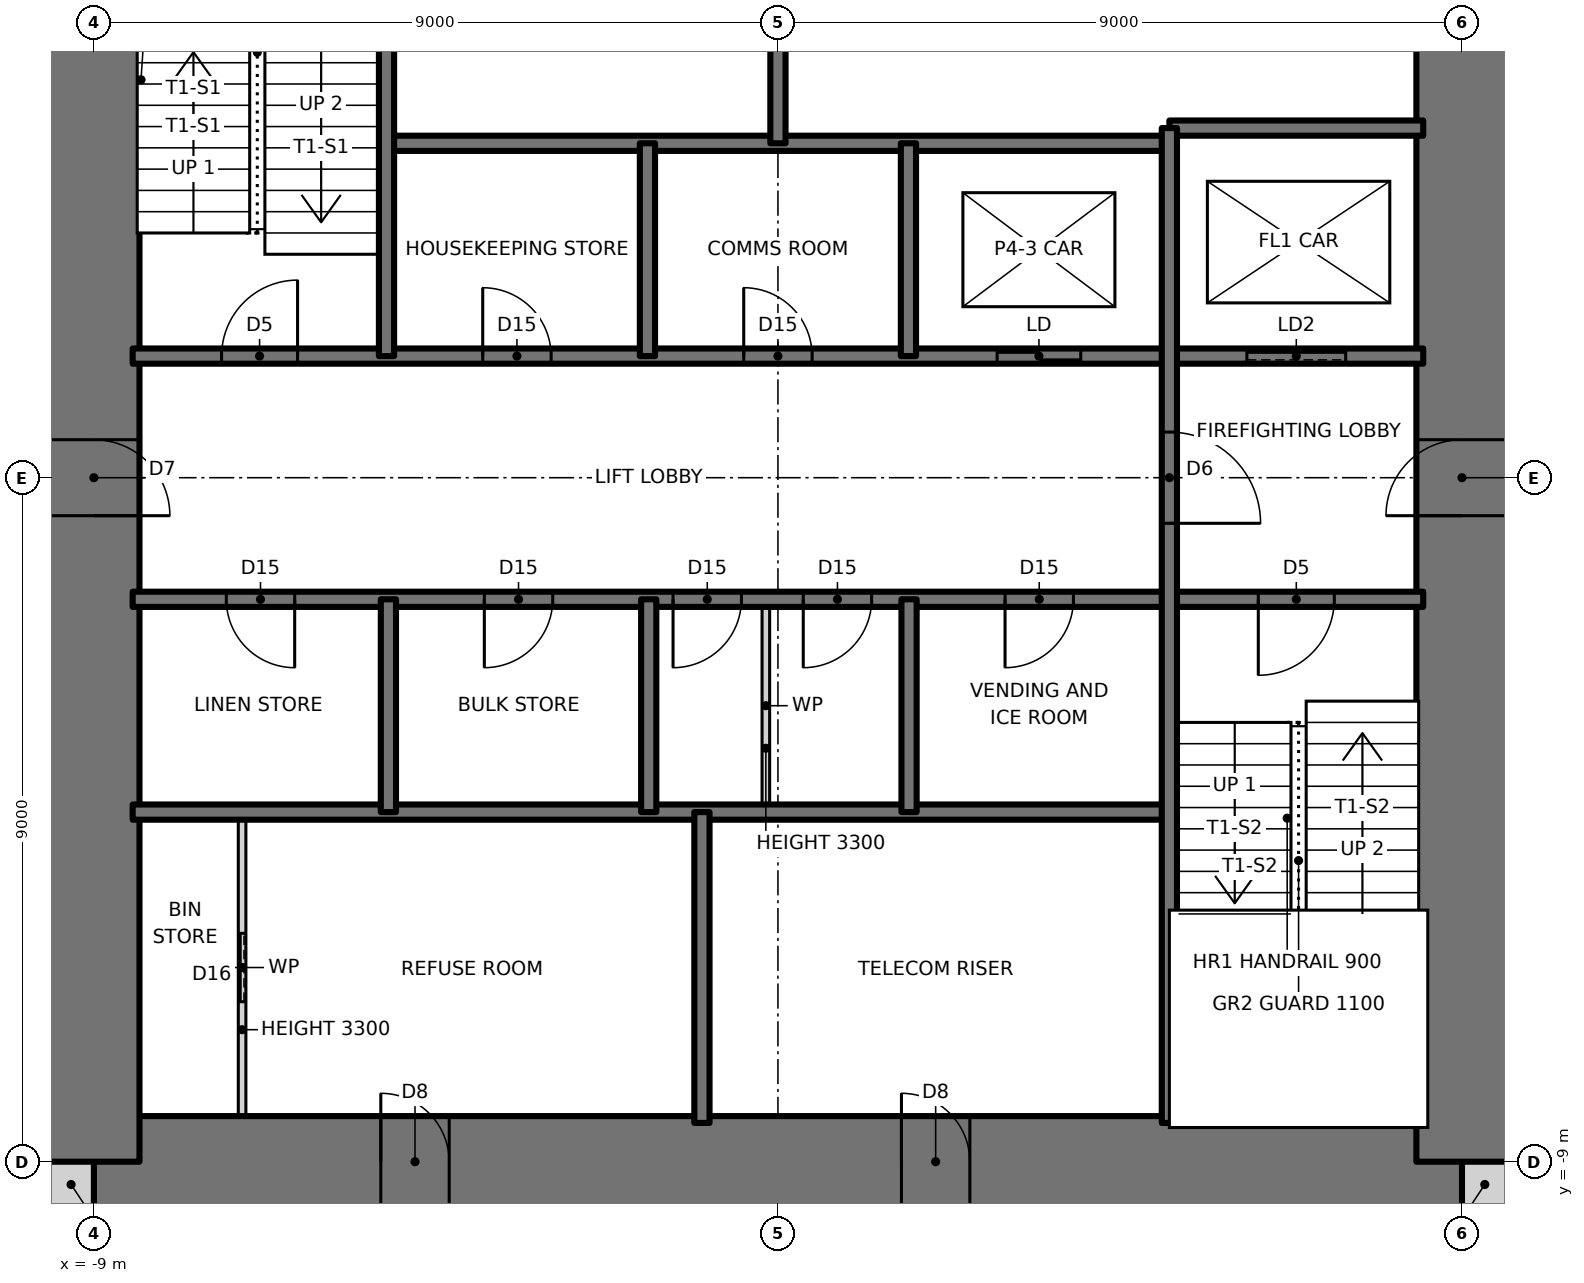
"""IFC4 building model, lengths in metres.
Left out: names, types, materials, properties, quantities, classifications, styles, units other than length and angle.
Written with IfcOpenShell. Run it as: python <this file> out.ifc"""

import sys

from ifc_helpers import new_model, si_unit, direction, frame, frame_2d, origin, place, context, subcontext, project, spatial, rectangle, extrude, element, fill, save


model = new_model("IFC4")
c1 = context("Model", 3, precision=1e-05, world=origin(), true_north=direction((0.0, 1.0)))
c2 = subcontext(c1, "Body", "Model", "MODEL_VIEW")
j1 = project(units=[si_unit("LENGTHUNIT", "METRE"), si_unit("PLANEANGLEUNIT", "RADIAN")], contexts=[c1])
p1 = place(None, origin())
s1 = spatial("IfcSite", under=j1, at=p1, CompositionType="ELEMENT")
p2 = place(p1, origin())
s2 = spatial("IfcBuilding", under=s1, at=p2, CompositionType="ELEMENT")
p3 = place(p2, frame((0.0, 0.0, 239.5)))
s3 = spatial("IfcBuildingStorey", under=s2, at=p3, CompositionType="ELEMENT", Elevation=239.5)
for number, where, z_axis, x_axis in (
    (1, (-9.6, -9.3, 0.0), (0.0, 0.0, 1.0), (1.0, 0.0, 0.0)),
    (2, (9.0, -9.3, 0.0), (0.0, 0.0, 1.0), (1.0, 0.0, 0.0)),
):
    element("IfcWall", number, at=place(p3, frame(where, z_axis=z_axis, x_axis=x_axis)), inside=s3, PredefinedType="SOLIDWALL", context=c2, shape_type="SweptSolid", body=[
        extrude(rectangle(XDim=0.6, YDim=0.6, at=frame_2d((0.3, 0.0))), origin(), (0.0, 0.0, 1.0), 3.5),
    ])
p4 = place(p3, frame((-9.0, -9.0, 0.0), z_axis=(0.0, 0.0, 1.0), x_axis=(1.0, 0.0, 0.0)))
e3 = element("IfcWall", 3, at=p4, inside=s3, PredefinedType="SHEAR", context=c2, shape_type="SweptSolid", body=[
    extrude(rectangle(XDim=18.0, YDim=1.2, at=frame_2d((9.0, 0.0))), origin(), (0.0, 0.0, 1.0), 3.5),
])
p5 = place(p4, frame((3.775, 0.0, 0.0)))
e4 = element("IfcOpeningElement", 4, at=p5, cuts=e3, PredefinedType="OPENING", context=c2, shape_type="SweptSolid", body=[
    extrude(rectangle(XDim=0.9, YDim=2.1, at=frame_2d((0.45, 1.05))), frame((0.0, 0.61, 0.0), z_axis=(0.0, -1.0, 0.0), x_axis=(1.0, 0.0, 0.0)), (0.0, 0.0, 1.0), 1.22),
])
p6 = place(p4, frame((10.625, 0.0, 0.0)))
e5 = element("IfcOpeningElement", 5, at=p6, cuts=e3, PredefinedType="OPENING", context=c2, shape_type="SweptSolid", body=[
    extrude(rectangle(XDim=0.9, YDim=2.1, at=frame_2d((0.45, 1.05))), frame((0.0, 0.61, 0.0), z_axis=(0.0, -1.0, 0.0), x_axis=(1.0, 0.0, 0.0)), (0.0, 0.0, 1.0), 1.22),
])
p7 = place(p3, frame((9.0, -9.0, 0.0), z_axis=(0.0, 0.0, 1.0), x_axis=(0.0, 1.0, 0.0)))
e6 = element("IfcWall", 6, at=p7, inside=s3, PredefinedType="SHEAR", context=c2, shape_type="SweptSolid", body=[
    extrude(rectangle(XDim=18.0, YDim=1.2, at=frame_2d((9.0, 0.0))), origin(), (0.0, 0.0, 1.0), 3.5),
])
p8 = place(p7, frame((8.5, 0.0, 0.0)))
e7 = element("IfcOpeningElement", 7, at=p8, cuts=e6, PredefinedType="OPENING", context=c2, shape_type="SweptSolid", body=[
    extrude(rectangle(XDim=1.0, YDim=2.1, at=frame_2d((0.5, 1.05))), frame((0.0, 0.61, 0.0), z_axis=(0.0, -1.0, 0.0), x_axis=(1.0, 0.0, 0.0)), (0.0, 0.0, 1.0), 1.22),
])
p9 = place(p3, frame((-9.0, 9.0, 0.0), z_axis=(0.0, 0.0, 1.0), x_axis=(0.0, -1.0, 0.0)))
e8 = element("IfcWall", 8, at=p9, inside=s3, PredefinedType="SHEAR", context=c2, shape_type="SweptSolid", body=[
    extrude(rectangle(XDim=18.0, YDim=1.2, at=frame_2d((9.0, 0.0))), origin(), (0.0, 0.0, 1.0), 3.5),
])
p10 = place(p9, frame((8.5, 0.0, 0.0)))
e9 = element("IfcOpeningElement", 9, at=p10, cuts=e8, PredefinedType="OPENING", context=c2, shape_type="SweptSolid", body=[
    extrude(rectangle(XDim=1.0, YDim=2.1, at=frame_2d((0.5, 1.05))), frame((0.0, 0.61, 0.0), z_axis=(0.0, -1.0, 0.0), x_axis=(1.0, 0.0, 0.0)), (0.0, 0.0, 1.0), 1.22),
])
p11 = place(p3, frame((-8.49, -4.4, 0.0), z_axis=(0.0, 0.0, 1.0), x_axis=(1.0, 0.0, 0.0)))
e10 = element("IfcWall", 10, at=p11, inside=s3, PredefinedType="SOLIDWALL", context=c2, shape_type="SweptSolid", body=[
    extrude(rectangle(XDim=13.64, YDim=0.2, at=frame_2d((6.82, 0.0))), origin(), (0.0, 0.0, 1.0), 3.5),
])
p12 = place(p3, frame((-8.49, -1.6, 0.0), z_axis=(0.0, 0.0, 1.0), x_axis=(1.0, 0.0, 0.0)))
e11 = element("IfcWall", 11, at=p12, inside=s3, PredefinedType="SOLIDWALL", context=c2, shape_type="SweptSolid", body=[
    extrude(rectangle(XDim=16.98, YDim=0.2, at=frame_2d((8.49, 0.0))), origin(), (0.0, 0.0, 1.0), 3.5),
])
p13 = place(p12, frame((14.81, 0.0, 0.0)))
e12 = element("IfcOpeningElement", 12, at=p13, cuts=e11, PredefinedType="OPENING", context=c2, shape_type="SweptSolid", body=[
    extrude(rectangle(XDim=1.0, YDim=2.1, at=frame_2d((0.5, 1.05))), frame((0.0, 0.11, 0.0), z_axis=(0.0, -1.0, 0.0), x_axis=(1.0, 0.0, 0.0)), (0.0, 0.0, 1.0), 0.22),
])
p14 = place(p12, frame((1.232, 0.0, 0.0)))
e13 = element("IfcOpeningElement", 13, at=p14, cuts=e11, PredefinedType="OPENING", context=c2, shape_type="SweptSolid", body=[
    extrude(rectangle(XDim=0.9, YDim=2.1, at=frame_2d((0.45, 1.05))), frame((0.0, 0.11, 0.0), z_axis=(0.0, -1.0, 0.0), x_axis=(1.0, 0.0, 0.0)), (0.0, 0.0, 1.0), 0.22),
])
p15 = place(p12, frame((4.627, 0.0, 0.0)))
e14 = element("IfcOpeningElement", 14, at=p15, cuts=e11, PredefinedType="OPENING", context=c2, shape_type="SweptSolid", body=[
    extrude(rectangle(XDim=0.9, YDim=2.1, at=frame_2d((0.45, 1.05))), frame((0.0, 0.11, 0.0), z_axis=(0.0, -1.0, 0.0), x_axis=(1.0, 0.0, 0.0)), (0.0, 0.0, 1.0), 0.22),
])
p16 = place(p12, frame((8.823, 0.0, 0.0)))
e15 = element("IfcOpeningElement", 15, at=p16, cuts=e11, PredefinedType="OPENING", context=c2, shape_type="SweptSolid", body=[
    extrude(rectangle(XDim=0.9, YDim=2.1, at=frame_2d((0.45, 1.05))), frame((0.0, 0.11, 0.0), z_axis=(0.0, -1.0, 0.0), x_axis=(1.0, 0.0, 0.0)), (0.0, 0.0, 1.0), 0.22),
])
p17 = place(p12, frame((7.11, 0.0, 0.0)))
e16 = element("IfcOpeningElement", 16, at=p17, cuts=e11, PredefinedType="OPENING", context=c2, shape_type="SweptSolid", body=[
    extrude(rectangle(XDim=0.9, YDim=2.1, at=frame_2d((0.45, 1.05))), frame((0.0, 0.11, 0.0), z_axis=(0.0, -1.0, 0.0), x_axis=(1.0, 0.0, 0.0)), (0.0, 0.0, 1.0), 0.22),
])
p18 = place(p12, frame((11.478, 0.0, 0.0)))
e17 = element("IfcOpeningElement", 17, at=p18, cuts=e11, PredefinedType="OPENING", context=c2, shape_type="SweptSolid", body=[
    extrude(rectangle(XDim=0.9, YDim=2.1, at=frame_2d((0.45, 1.05))), frame((0.0, 0.11, 0.0), z_axis=(0.0, -1.0, 0.0), x_axis=(1.0, 0.0, 0.0)), (0.0, 0.0, 1.0), 0.22),
])
p19 = place(p3, frame((-8.49, 1.6, 0.0), z_axis=(0.0, 0.0, 1.0), x_axis=(1.0, 0.0, 0.0)))
e18 = element("IfcWall", 18, at=p19, inside=s3, PredefinedType="SOLIDWALL", context=c2, shape_type="SweptSolid", body=[
    extrude(rectangle(XDim=16.98, YDim=0.2, at=frame_2d((8.49, 0.0))), origin(), (0.0, 0.0, 1.0), 3.5),
])
p20 = place(p19, frame((1.17, 0.0, 0.0)))
e19 = element("IfcOpeningElement", 19, at=p20, cuts=e18, PredefinedType="OPENING", context=c2, shape_type="SweptSolid", body=[
    extrude(rectangle(XDim=1.0, YDim=2.1, at=frame_2d((0.5, 1.05))), frame((0.0, 0.11, 0.0), z_axis=(0.0, -1.0, 0.0), x_axis=(1.0, 0.0, 0.0)), (0.0, 0.0, 1.0), 0.22),
])
p21 = place(p19, frame((4.606, 0.0, 0.0)))
e20 = element("IfcOpeningElement", 20, at=p21, cuts=e18, PredefinedType="OPENING", context=c2, shape_type="SweptSolid", body=[
    extrude(rectangle(XDim=0.9, YDim=2.1, at=frame_2d((0.45, 1.05))), frame((0.0, 0.11, 0.0), z_axis=(0.0, -1.0, 0.0), x_axis=(1.0, 0.0, 0.0)), (0.0, 0.0, 1.0), 0.22),
])
p22 = place(p19, frame((8.04, 0.0, 0.0)))
e21 = element("IfcOpeningElement", 21, at=p22, cuts=e18, PredefinedType="OPENING", context=c2, shape_type="SweptSolid", body=[
    extrude(rectangle(XDim=0.9, YDim=2.1, at=frame_2d((0.45, 1.05))), frame((0.0, 0.11, 0.0), z_axis=(0.0, -1.0, 0.0), x_axis=(1.0, 0.0, 0.0)), (0.0, 0.0, 1.0), 0.22),
])
p23 = place(p19, frame((11.374, 0.0, 0.0)))
e22 = element("IfcOpeningElement", 22, at=p23, cuts=e18, PredefinedType="OPENING", context=c2, shape_type="SweptSolid", body=[
    extrude(rectangle(XDim=1.1, YDim=2.1, at=frame_2d((0.55, 1.05))), frame((0.0, 0.11, 0.0), z_axis=(0.0, -1.0, 0.0), x_axis=(1.0, 0.0, 0.0)), (0.0, 0.0, 1.0), 0.22),
])
p24 = place(p19, frame((14.66, 0.0, 0.0)))
e23 = element("IfcOpeningElement", 23, at=p24, cuts=e18, PredefinedType="OPENING", context=c2, shape_type="SweptSolid", body=[
    extrude(rectangle(XDim=1.3, YDim=2.1, at=frame_2d((0.65, 1.05))), frame((0.0, 0.11, 0.0), z_axis=(0.0, -1.0, 0.0), x_axis=(1.0, 0.0, 0.0)), (0.0, 0.0, 1.0), 0.22),
])
p25 = place(p3, frame((-5.15, 4.4, 0.0), z_axis=(0.0, 0.0, 1.0), x_axis=(1.0, 0.0, 0.0)))
e24 = element("IfcWall", 24, at=p25, inside=s3, PredefinedType="SOLIDWALL", context=c2, shape_type="SweptSolid", body=[
    extrude(rectangle(XDim=10.3, YDim=0.2, at=frame_2d((5.15, 0.0))), origin(), (0.0, 0.0, 1.0), 3.5),
])
p26 = place(p3, frame((5.15, 4.6, 0.0), z_axis=(0.0, 0.0, 1.0), x_axis=(1.0, 0.0, 0.0)))
e25 = element("IfcWall", 25, at=p26, inside=s3, PredefinedType="SOLIDWALL", context=c2, shape_type="SweptSolid", body=[
    extrude(rectangle(XDim=3.34, YDim=0.2, at=frame_2d((1.67, 0.0))), origin(), (0.0, 0.0, 1.0), 3.5),
])
p27 = place(p3, frame((5.15, -8.49, 0.0), z_axis=(0.0, 0.0, 1.0), x_axis=(0.0, 1.0, 0.0)))
e26 = element("IfcWall", 26, at=p27, inside=s3, PredefinedType="SOLIDWALL", context=c2, shape_type="SweptSolid", body=[
    extrude(rectangle(XDim=13.09, YDim=0.2, at=frame_2d((6.545, 0.0))), origin(), (0.0, 0.0, 1.0), 3.5),
])
p28 = place(p27, frame((7.89, 0.0, 0.0)))
e27 = element("IfcOpeningElement", 27, at=p28, cuts=e26, PredefinedType="OPENING", context=c2, shape_type="SweptSolid", body=[
    extrude(rectangle(XDim=1.2, YDim=2.1, at=frame_2d((0.6, 1.05))), frame((0.0, 0.11, 0.0), z_axis=(0.0, -1.0, 0.0), x_axis=(1.0, 0.0, 0.0)), (0.0, 0.0, 1.0), 0.22),
])
for number, where, z_axis, x_axis in (
    (28, (1.725, -4.4, 0.0), (0.0, 0.0, 1.0), (0.0, 1.0, 0.0)),
    (29, (1.717, 1.6, 0.0), (0.0, 0.0, 1.0), (0.0, 1.0, 0.0)),
):
    element("IfcWall", number, at=place(p3, frame(where, z_axis=z_axis, x_axis=x_axis)), inside=s3, PredefinedType="SOLIDWALL", context=c2, shape_type="SweptSolid", body=[
        extrude(rectangle(XDim=2.8, YDim=0.2, at=frame_2d((1.4, 0.0))), origin(), (0.0, 0.0, 1.0), 3.5),
    ])
p29 = place(p3, frame((0.0, 4.4, 0.0), z_axis=(0.0, 0.0, 1.0), x_axis=(0.0, 1.0, 0.0)))
e30 = element("IfcWall", 30, at=p29, inside=s3, PredefinedType="SOLIDWALL", context=c2, shape_type="SweptSolid", body=[
    extrude(rectangle(XDim=4.09, YDim=0.2, at=frame_2d((2.045, 0.0))), origin(), (0.0, 0.0, 1.0), 3.5),
])
p30 = place(p3, frame((-0.159, -4.4, 0.0), z_axis=(0.0, 0.0, 1.0), x_axis=(0.0, 1.0, 0.0)))
e31 = element("IfcWall", 31, at=p30, inside=s3, PredefinedType="PARTITIONING", context=c2, shape_type="SweptSolid", body=[
    extrude(rectangle(XDim=2.8, YDim=0.1, at=frame_2d((1.4, 0.0))), origin(), (0.0, 0.0, 1.0), 3.3),
])
p31 = place(p3, frame((-1.0, -8.49, 0.0), z_axis=(0.0, 0.0, 1.0), x_axis=(0.0, 1.0, 0.0)))
e32 = element("IfcWall", 32, at=p31, inside=s3, PredefinedType="SOLIDWALL", context=c2, shape_type="SweptSolid", body=[
    extrude(rectangle(XDim=4.09, YDim=0.2, at=frame_2d((2.045, 0.0))), origin(), (0.0, 0.0, 1.0), 3.5),
])
for number, where, z_axis, x_axis in (
    (33, (-1.7, -4.4, 0.0), (0.0, 0.0, 1.0), (0.0, 1.0, 0.0)),
    (34, (-1.717, 1.6, 0.0), (0.0, 0.0, 1.0), (0.0, 1.0, 0.0)),
    (35, (-5.125, -4.4, 0.0), (0.0, 0.0, 1.0), (0.0, 1.0, 0.0)),
):
    element("IfcWall", number, at=place(p3, frame(where, z_axis=z_axis, x_axis=x_axis)), inside=s3, PredefinedType="SOLIDWALL", context=c2, shape_type="SweptSolid", body=[
        extrude(rectangle(XDim=2.8, YDim=0.2, at=frame_2d((1.4, 0.0))), origin(), (0.0, 0.0, 1.0), 3.5),
    ])
p32 = place(p3, frame((-5.15, 1.6, 0.0), z_axis=(0.0, 0.0, 1.0), x_axis=(0.0, 1.0, 0.0)))
e36 = element("IfcWall", 36, at=p32, inside=s3, PredefinedType="SOLIDWALL", context=c2, shape_type="SweptSolid", body=[
    extrude(rectangle(XDim=6.89, YDim=0.2, at=frame_2d((3.445, 0.0))), origin(), (0.0, 0.0, 1.0), 3.5),
])
p33 = place(p3, frame((-7.05, -8.49, 0.0), z_axis=(0.0, 0.0, 1.0), x_axis=(0.0, 1.0, 0.0)))
e37 = element("IfcWall", 37, at=p33, inside=s3, PredefinedType="PARTITIONING", context=c2, shape_type="SweptSolid", body=[
    extrude(rectangle(XDim=4.09, YDim=0.1, at=frame_2d((2.045, 0.0))), origin(), (0.0, 0.0, 1.0), 3.3),
])
p34 = place(p33, frame((1.595, 0.0, 0.0)))
e38 = element("IfcOpeningElement", 38, at=p34, cuts=e37, PredefinedType="OPENING", context=c2, shape_type="SweptSolid", body=[
    extrude(rectangle(XDim=0.9, YDim=2.1, at=frame_2d((0.45, 1.05))), frame((0.0, 0.06, 0.0), z_axis=(0.0, -1.0, 0.0), x_axis=(1.0, 0.0, 0.0)), (0.0, 0.0, 1.0), 0.12),
])
p35 = place(p20, origin())
e39 = element("IfcDoor", 39, at=p35, inside=s3, OperationType="SINGLE_SWING_RIGHT", PredefinedType="DOOR", context=c2, shape_type="SweptSolid", body=[
    extrude(rectangle(XDim=1.0, YDim=2.1, at=frame_2d((0.5, 1.05))), frame((0.0, 0.025, 0.0), z_axis=(0.0, -1.0, 0.0), x_axis=(1.0, 0.0, 0.0)), (0.0, 0.0, 1.0), 0.05),
])
fill(e19, e39)
p36 = place(p13, frame((1.0, 0.0, 0.0), z_axis=(0.0, 0.0, 1.0), x_axis=(-1.0, 0.0, 0.0)))
e40 = element("IfcDoor", 40, at=p36, inside=s3, OperationType="SINGLE_SWING_RIGHT", PredefinedType="DOOR", context=c2, shape_type="SweptSolid", body=[
    extrude(rectangle(XDim=1.0, YDim=2.1, at=frame_2d((0.5, 1.05))), frame((0.0, 0.025, 0.0), z_axis=(0.0, -1.0, 0.0), x_axis=(1.0, 0.0, 0.0)), (0.0, 0.0, 1.0), 0.05),
])
fill(e12, e40)
p37 = place(p28, frame((1.2, 0.0, 0.0), z_axis=(0.0, 0.0, 1.0), x_axis=(-1.0, 0.0, 0.0)))
e41 = element("IfcDoor", 41, at=p37, inside=s3, OperationType="SINGLE_SWING_RIGHT", PredefinedType="DOOR", context=c2, shape_type="SweptSolid", body=[
    extrude(rectangle(XDim=1.2, YDim=2.1, at=frame_2d((0.6, 1.05))), frame((0.0, 0.025, 0.0), z_axis=(0.0, -1.0, 0.0), x_axis=(1.0, 0.0, 0.0)), (0.0, 0.0, 1.0), 0.05),
])
fill(e27, e41)
p38 = place(p21, origin())
e42 = element("IfcDoor", 42, at=p38, inside=s3, OperationType="SINGLE_SWING_LEFT", PredefinedType="DOOR", context=c2, shape_type="SweptSolid", body=[
    extrude(rectangle(XDim=0.9, YDim=2.1, at=frame_2d((0.45, 1.05))), frame((0.0, 0.025, 0.0), z_axis=(0.0, -1.0, 0.0), x_axis=(1.0, 0.0, 0.0)), (0.0, 0.0, 1.0), 0.05),
])
fill(e20, e42)
p39 = place(p22, origin())
e43 = element("IfcDoor", 43, at=p39, inside=s3, OperationType="SINGLE_SWING_LEFT", PredefinedType="DOOR", context=c2, shape_type="SweptSolid", body=[
    extrude(rectangle(XDim=0.9, YDim=2.1, at=frame_2d((0.45, 1.05))), frame((0.0, 0.025, 0.0), z_axis=(0.0, -1.0, 0.0), x_axis=(1.0, 0.0, 0.0)), (0.0, 0.0, 1.0), 0.05),
])
fill(e21, e43)
p40 = place(p14, frame((0.9, 0.0, 0.0), z_axis=(0.0, 0.0, 1.0), x_axis=(-1.0, 0.0, 0.0)))
e44 = element("IfcDoor", 44, at=p40, inside=s3, OperationType="SINGLE_SWING_LEFT", PredefinedType="DOOR", context=c2, shape_type="SweptSolid", body=[
    extrude(rectangle(XDim=0.9, YDim=2.1, at=frame_2d((0.45, 1.05))), frame((0.0, 0.025, 0.0), z_axis=(0.0, -1.0, 0.0), x_axis=(1.0, 0.0, 0.0)), (0.0, 0.0, 1.0), 0.05),
])
fill(e13, e44)
p41 = place(p15, frame((0.9, 0.0, 0.0), z_axis=(0.0, 0.0, 1.0), x_axis=(-1.0, 0.0, 0.0)))
e45 = element("IfcDoor", 45, at=p41, inside=s3, OperationType="SINGLE_SWING_RIGHT", PredefinedType="DOOR", context=c2, shape_type="SweptSolid", body=[
    extrude(rectangle(XDim=0.9, YDim=2.1, at=frame_2d((0.45, 1.05))), frame((0.0, 0.025, 0.0), z_axis=(0.0, -1.0, 0.0), x_axis=(1.0, 0.0, 0.0)), (0.0, 0.0, 1.0), 0.05),
])
fill(e14, e45)
p42 = place(p16, frame((0.9, 0.0, 0.0), z_axis=(0.0, 0.0, 1.0), x_axis=(-1.0, 0.0, 0.0)))
e46 = element("IfcDoor", 46, at=p42, inside=s3, OperationType="SINGLE_SWING_RIGHT", PredefinedType="DOOR", context=c2, shape_type="SweptSolid", body=[
    extrude(rectangle(XDim=0.9, YDim=2.1, at=frame_2d((0.45, 1.05))), frame((0.0, 0.025, 0.0), z_axis=(0.0, -1.0, 0.0), x_axis=(1.0, 0.0, 0.0)), (0.0, 0.0, 1.0), 0.05),
])
fill(e15, e46)
p43 = place(p17, frame((0.9, 0.0, 0.0), z_axis=(0.0, 0.0, 1.0), x_axis=(-1.0, 0.0, 0.0)))
e47 = element("IfcDoor", 47, at=p43, inside=s3, OperationType="SINGLE_SWING_RIGHT", PredefinedType="DOOR", context=c2, shape_type="SweptSolid", body=[
    extrude(rectangle(XDim=0.9, YDim=2.1, at=frame_2d((0.45, 1.05))), frame((0.0, 0.025, 0.0), z_axis=(0.0, -1.0, 0.0), x_axis=(1.0, 0.0, 0.0)), (0.0, 0.0, 1.0), 0.05),
])
fill(e16, e47)
p44 = place(p18, frame((0.9, 0.0, 0.0), z_axis=(0.0, 0.0, 1.0), x_axis=(-1.0, 0.0, 0.0)))
e48 = element("IfcDoor", 48, at=p44, inside=s3, OperationType="SINGLE_SWING_RIGHT", PredefinedType="DOOR", context=c2, shape_type="SweptSolid", body=[
    extrude(rectangle(XDim=0.9, YDim=2.1, at=frame_2d((0.45, 1.05))), frame((0.0, 0.025, 0.0), z_axis=(0.0, -1.0, 0.0), x_axis=(1.0, 0.0, 0.0)), (0.0, 0.0, 1.0), 0.05),
])
fill(e17, e48)
p45 = place(p34, origin())
e49 = element("IfcDoor", 49, at=p45, inside=s3, OperationType="SLIDING_TO_LEFT", PredefinedType="DOOR", context=c2, shape_type="SweptSolid", body=[
    extrude(rectangle(XDim=0.9, YDim=2.1, at=frame_2d((0.45, 1.05))), frame((0.0, 0.025, 0.0), z_axis=(0.0, -1.0, 0.0), x_axis=(1.0, 0.0, 0.0)), (0.0, 0.0, 1.0), 0.05),
])
fill(e38, e49)
p46 = place(p10, origin())
e50 = element("IfcDoor", 50, at=p46, inside=s3, OperationType="SINGLE_SWING_RIGHT", PredefinedType="DOOR", context=c2, shape_type="SweptSolid", body=[
    extrude(rectangle(XDim=1.0, YDim=2.1, at=frame_2d((0.5, 1.05))), frame((0.0, 0.025, 0.0), z_axis=(0.0, -1.0, 0.0), x_axis=(1.0, 0.0, 0.0)), (0.0, 0.0, 1.0), 0.05),
])
fill(e9, e50)
p47 = place(p8, origin())
e51 = element("IfcDoor", 51, at=p47, inside=s3, OperationType="SINGLE_SWING_LEFT", PredefinedType="DOOR", context=c2, shape_type="SweptSolid", body=[
    extrude(rectangle(XDim=1.0, YDim=2.1, at=frame_2d((0.5, 1.05))), frame((0.0, 0.025, 0.0), z_axis=(0.0, -1.0, 0.0), x_axis=(1.0, 0.0, 0.0)), (0.0, 0.0, 1.0), 0.05),
])
fill(e7, e51)
p48 = place(p5, origin())
e52 = element("IfcDoor", 52, at=p48, inside=s3, OperationType="SINGLE_SWING_LEFT", PredefinedType="DOOR", context=c2, shape_type="SweptSolid", body=[
    extrude(rectangle(XDim=0.9, YDim=2.1, at=frame_2d((0.45, 1.05))), frame((0.0, 0.025, 0.0), z_axis=(0.0, -1.0, 0.0), x_axis=(1.0, 0.0, 0.0)), (0.0, 0.0, 1.0), 0.05),
])
fill(e4, e52)
p49 = place(p6, origin())
e53 = element("IfcDoor", 53, at=p49, inside=s3, OperationType="SINGLE_SWING_LEFT", PredefinedType="DOOR", context=c2, shape_type="SweptSolid", body=[
    extrude(rectangle(XDim=0.9, YDim=2.1, at=frame_2d((0.45, 1.05))), frame((0.0, 0.025, 0.0), z_axis=(0.0, -1.0, 0.0), x_axis=(1.0, 0.0, 0.0)), (0.0, 0.0, 1.0), 0.05),
])
fill(e5, e53)
p50 = place(p23, origin())
e54 = element("IfcDoor", 54, at=p50, inside=s3, OperationType="DOUBLE_DOOR_SLIDING", PredefinedType="DOOR", context=c2, shape_type="SweptSolid", body=[
    extrude(rectangle(XDim=1.1, YDim=2.1, at=frame_2d((0.55, 1.05))), frame((0.0, 0.025, 0.0), z_axis=(0.0, -1.0, 0.0), x_axis=(1.0, 0.0, 0.0)), (0.0, 0.0, 1.0), 0.05),
])
fill(e22, e54)
p51 = place(p24, origin())
e55 = element("IfcDoor", 55, at=p51, inside=s3, OperationType="SLIDING_TO_LEFT", PredefinedType="DOOR", context=c2, shape_type="SweptSolid", body=[
    extrude(rectangle(XDim=1.3, YDim=2.1, at=frame_2d((0.65, 1.05))), frame((0.0, 0.025, 0.0), z_axis=(0.0, -1.0, 0.0), x_axis=(1.0, 0.0, 0.0)), (0.0, 0.0, 1.0), 0.05),
])
fill(e23, e55)
save(model, sys.argv[1])
